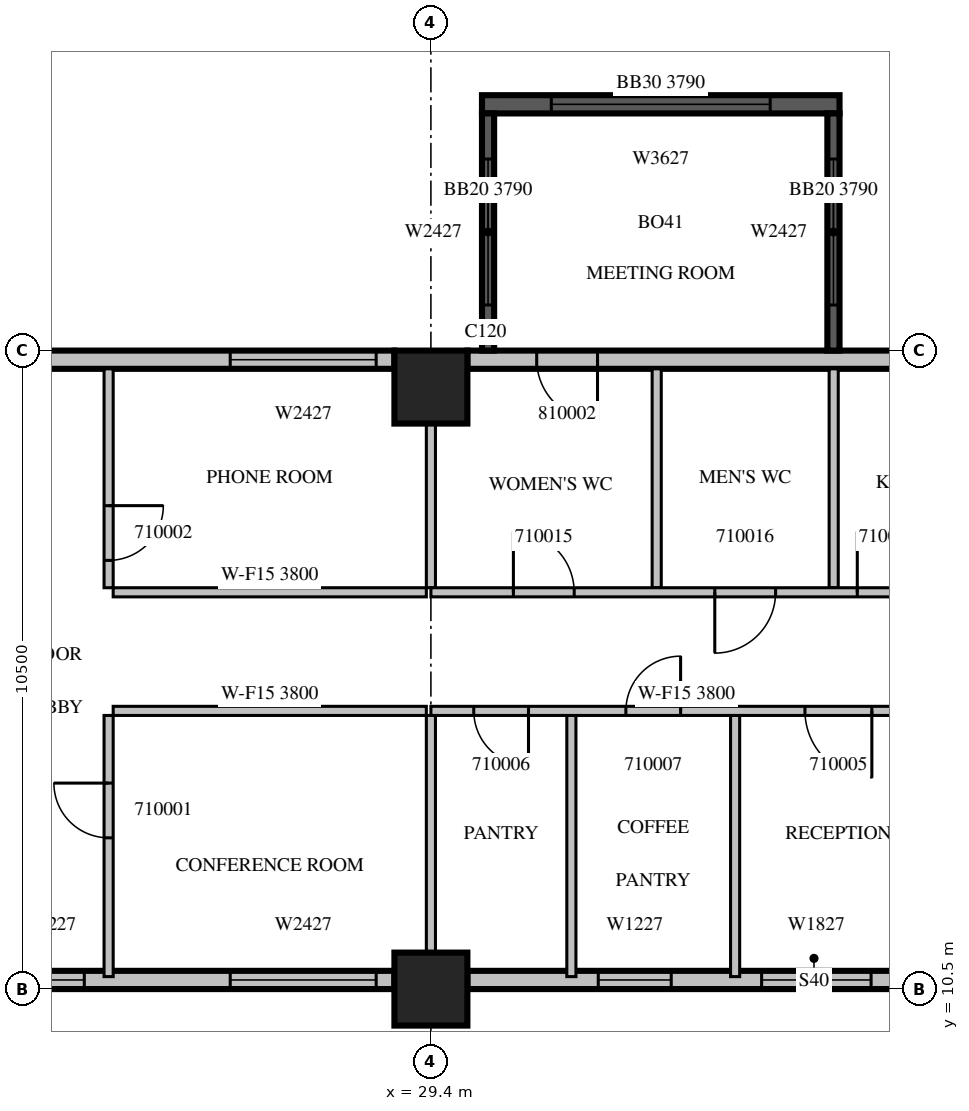
"""IFC4 building model, lengths in metres.
Left out: names, types, materials, properties, quantities, classifications, styles, units other than length and angle.
Written with IfcOpenShell. Run it as: python <this file> out.ifc"""

import sys

from ifc_helpers import new_model, si_unit, direction, frame, frame_2d, origin, origin_2d, place, context, subcontext, project, spatial, rectangle, extrude, source, transform, mapped, element, fill, save


model = new_model("IFC4")
c1 = context("Model", 3, precision=1e-05, world=origin(), true_north=direction((0.0, 1.0)))
c2 = subcontext(c1, "Body", "Model", "MODEL_VIEW")
j1 = project(units=[si_unit("LENGTHUNIT", "METRE"), si_unit("PLANEANGLEUNIT", "RADIAN")], contexts=[c1])
p1 = place(None, origin())
s1 = spatial("IfcSite", under=j1, at=p1, CompositionType="ELEMENT")
p2 = place(p1, origin())
s2 = spatial("IfcBuilding", under=s1, at=p2, CompositionType="ELEMENT")
p3 = place(p2, frame((0.0, 0.0, 53.1)))
s3 = spatial("IfcBuildingStorey", under=s2, at=p3, CompositionType="ELEMENT", Elevation=53.1)
m1 = source(origin(), c2, "Body", "SweptSolid", [
    extrude(rectangle(XDim=1.2, YDim=1.2, at=origin_2d()), origin(), (0.0, 0.0, 1.0), 4.2),
])
for number, where, z_axis, x_axis in (
    (1, (29.4, 10.5, 0.0), (0.0, 0.0, 1.0), (1.0, 0.0, 0.0)),
    (2, (29.4, 20.4, 0.0), (0.0, 0.0, 1.0), (1.0, 0.0, 0.0)),
):
    element("IfcColumn", number, at=place(p3, frame(where, z_axis=z_axis, x_axis=x_axis)), inside=s3, PredefinedType="COLUMN", context=c2, shape_type="MappedRepresentation", body=[
        mapped(m1, transform((0.0, 0.0, 0.0), scale=1.0)),
    ])
m2 = source(origin(), c2, "Body", "SweptSolid", [
    extrude(rectangle(XDim=6.6, YDim=0.3, at=frame_2d((3.3, 0.0))), origin(), (0.0, 0.0, 1.0), 3.8),
])
p4 = place(p3, frame((22.2, 10.65, 0.0), z_axis=(0.0, 0.0, 1.0), x_axis=(1.0, 0.0, 0.0)))
e3 = element("IfcWall", 3, at=p4, inside=s3, PredefinedType="STANDARD", context=c2, shape_type="MappedRepresentation", body=[
    mapped(m2, transform((0.0, 0.0, 0.0), scale=1.0)),
])
m3 = source(origin(), c2, "Body", "SweptSolid", [
    extrude(rectangle(XDim=1.2, YDim=2.7, at=frame_2d((0.6, 1.35))), frame((0.0, 0.16, 0.0), z_axis=(0.0, -1.0, 0.0), x_axis=(1.0, 0.0, 0.0)), (0.0, 0.0, 1.0), 0.32),
])
p5 = place(p4, frame((0.3, 0.0, 0.6)))
e4 = element("IfcOpeningElement", 4, at=p5, cuts=e3, PredefinedType="OPENING", context=c2, shape_type="MappedRepresentation", body=[
    mapped(m3, transform((0.0, 0.0, 0.0), scale=1.0)),
])
m4 = source(origin(), c2, "Body", "SweptSolid", [
    extrude(rectangle(XDim=2.4, YDim=2.7, at=frame_2d((1.2, 1.35))), frame((0.0, 0.16, 0.0), z_axis=(0.0, -1.0, 0.0), x_axis=(1.0, 0.0, 0.0)), (0.0, 0.0, 1.0), 0.32),
])
p6 = place(p4, frame((3.9, 0.0, 0.6)))
e5 = element("IfcOpeningElement", 5, at=p6, cuts=e3, PredefinedType="OPENING", context=c2, shape_type="MappedRepresentation", body=[
    mapped(m4, transform((0.0, 0.0, 0.0), scale=1.0)),
])
m5 = source(origin(), c2, "Body", "SweptSolid", [
    extrude(rectangle(XDim=7.2, YDim=0.3, at=frame_2d((3.6, 0.0))), origin(), (0.0, 0.0, 1.0), 3.8),
])
p7 = place(p3, frame((30.0, 10.65, 0.0), z_axis=(0.0, 0.0, 1.0), x_axis=(1.0, 0.0, 0.0)))
e6 = element("IfcWall", 6, at=p7, inside=s3, PredefinedType="STANDARD", context=c2, shape_type="MappedRepresentation", body=[
    mapped(m5, transform((0.0, 0.0, 0.0), scale=1.0)),
])
m6 = source(origin(), c2, "Body", "SweptSolid", [
    extrude(rectangle(XDim=1.8, YDim=2.7, at=frame_2d((0.9, 1.35))), frame((0.0, 0.16, 0.0), z_axis=(0.0, -1.0, 0.0), x_axis=(1.0, 0.0, 0.0)), (0.0, 0.0, 1.0), 0.32),
])
p8 = place(p7, frame((4.839, 0.0, 0.6)))
e7 = element("IfcOpeningElement", 7, at=p8, cuts=e6, PredefinedType="OPENING", context=c2, shape_type="MappedRepresentation", body=[
    mapped(m6, transform((0.0, 0.0, 0.0), scale=1.0)),
])
p9 = place(p7, frame((2.152, 0.0, 0.6)))
e8 = element("IfcOpeningElement", 8, at=p9, cuts=e6, PredefinedType="OPENING", context=c2, shape_type="MappedRepresentation", body=[
    mapped(m3, transform((0.0, 0.0, 0.0), scale=1.0)),
])
p10 = place(p3, frame((37.2, 20.85, 0.0), z_axis=(0.0, 0.0, 1.0), x_axis=(-1.0, 0.0, 0.0)))
e9 = element("IfcWall", 9, at=p10, inside=s3, PredefinedType="STANDARD", context=c2, shape_type="MappedRepresentation", body=[
    mapped(m5, transform((0.0, 0.0, 0.0), scale=1.0)),
])
m7 = source(origin(), c2, "Body", "SweptSolid", [
    extrude(rectangle(XDim=1.0, YDim=2.1, at=frame_2d((0.5, 1.05))), frame((0.0, 0.16, 0.0), z_axis=(0.0, -1.0, 0.0), x_axis=(1.0, 0.0, 0.0)), (0.0, 0.0, 1.0), 0.32),
])
p11 = place(p10, frame((5.06, 0.0, 0.0)))
e10 = element("IfcOpeningElement", 10, at=p11, cuts=e9, PredefinedType="OPENING", context=c2, shape_type="MappedRepresentation", body=[
    mapped(m7, transform((0.0, 0.0, 0.0), scale=1.0)),
])
p12 = place(p3, frame((28.8, 20.85, 0.0), z_axis=(0.0, 0.0, 1.0), x_axis=(-1.0, 0.0, 0.0)))
e11 = element("IfcWall", 11, at=p12, inside=s3, PredefinedType="STANDARD", context=c2, shape_type="MappedRepresentation", body=[
    mapped(m2, transform((0.0, 0.0, 0.0), scale=1.0)),
])
p13 = place(p12, frame((0.3, 0.0, 0.6)))
e12 = element("IfcOpeningElement", 12, at=p13, cuts=e11, PredefinedType="OPENING", context=c2, shape_type="MappedRepresentation", body=[
    mapped(m4, transform((0.0, 0.0, 0.0), scale=1.0)),
])
m8 = source(origin(), c2, "Body", "SweptSolid", [
    extrude(rectangle(XDim=5.88, YDim=0.3, at=frame_2d((2.94, 0.0))), origin(), (0.0, 0.0, 1.0), 3.79),
])
p14 = place(p3, frame((36.12, 25.05, 0.0), z_axis=(0.0, 0.0, 1.0), x_axis=(-1.0, 0.0, 0.0)))
e13 = element("IfcWall", 13, at=p14, inside=s3, PredefinedType="SOLIDWALL", context=c2, shape_type="MappedRepresentation", body=[
    mapped(m8, transform((0.0, 0.0, 0.0), scale=1.0)),
])
m9 = source(origin(), c2, "Body", "SweptSolid", [
    extrude(rectangle(XDim=3.6, YDim=2.7, at=frame_2d((1.8, 1.35))), frame((0.0, 0.16, 0.0), z_axis=(0.0, -1.0, 0.0), x_axis=(1.0, 0.0, 0.0)), (0.0, 0.0, 1.0), 0.32),
])
p15 = place(p14, frame((1.14, 0.0, 0.6)))
e14 = element("IfcOpeningElement", 14, at=p15, cuts=e13, PredefinedType="OPENING", context=c2, shape_type="MappedRepresentation", body=[
    mapped(m9, transform((0.0, 0.0, 0.0), scale=1.0)),
])
m10 = source(origin(), c2, "Body", "SweptSolid", [
    extrude(rectangle(XDim=3.9, YDim=0.2, at=frame_2d((1.95, 0.0))), origin(), (0.0, 0.0, 1.0), 3.79),
])
p16 = place(p3, frame((36.02, 21.0, 0.0), z_axis=(0.0, 0.0, 1.0), x_axis=(0.0, 1.0, 0.0)))
e15 = element("IfcWall", 15, at=p16, inside=s3, PredefinedType="SOLIDWALL", context=c2, shape_type="MappedRepresentation", body=[
    mapped(m10, transform((0.0, 0.0, 0.0), scale=1.0)),
])
m11 = source(origin(), c2, "Body", "SweptSolid", [
    extrude(rectangle(XDim=2.4, YDim=2.7, at=frame_2d((1.2, 1.35))), frame((0.0, 0.11, 0.0), z_axis=(0.0, -1.0, 0.0), x_axis=(1.0, 0.0, 0.0)), (0.0, 0.0, 1.0), 0.22),
])
p17 = place(p16, frame((0.75, 0.0, 0.6)))
e16 = element("IfcOpeningElement", 16, at=p17, cuts=e15, PredefinedType="OPENING", context=c2, shape_type="MappedRepresentation", body=[
    mapped(m11, transform((0.0, 0.0, 0.0), scale=1.0)),
])
p18 = place(p3, frame((30.34, 21.0, 0.0), z_axis=(0.0, 0.0, 1.0), x_axis=(0.0, 1.0, 0.0)))
e17 = element("IfcWall", 17, at=p18, inside=s3, PredefinedType="SOLIDWALL", context=c2, shape_type="MappedRepresentation", body=[
    mapped(m10, transform((0.0, 0.0, 0.0), scale=1.0)),
])
p19 = place(p18, frame((0.75, 0.0, 0.6)))
e18 = element("IfcOpeningElement", 18, at=p19, cuts=e17, PredefinedType="OPENING", context=c2, shape_type="MappedRepresentation", body=[
    mapped(m11, transform((0.0, 0.0, 0.0), scale=1.0)),
])
m12 = source(origin(), c2, "Body", "SweptSolid", [
    extrude(rectangle(XDim=4.295, YDim=0.15, at=frame_2d((2.147, 0.0))), origin(), (0.0, 0.0, 1.0), 3.8),
])
p20 = place(p3, frame((24.1, 15.0, 0.0), z_axis=(0.0, 0.0, 1.0), x_axis=(0.0, -1.0, 0.0)))
e19 = element("IfcWall", 19, at=p20, inside=s3, PredefinedType="PARTITIONING", context=c2, shape_type="MappedRepresentation", body=[
    mapped(m12, transform((0.0, 0.0, 0.0), scale=1.0)),
])
m13 = source(origin(), c2, "Body", "SweptSolid", [
    extrude(rectangle(XDim=0.9, YDim=2.1, at=frame_2d((0.45, 1.05))), frame((0.0, 0.085, 0.0), z_axis=(0.0, -1.0, 0.0), x_axis=(1.0, 0.0, 0.0)), (0.0, 0.0, 1.0), 0.17),
])
p21 = place(p20, frame((1.113, 0.0, 0.0)))
e20 = element("IfcOpeningElement", 20, at=p21, cuts=e19, PredefinedType="OPENING", context=c2, shape_type="MappedRepresentation", body=[
    mapped(m13, transform((0.0, 0.0, 0.0), scale=1.0)),
])
m14 = source(origin(), c2, "Body", "SweptSolid", [
    extrude(rectangle(XDim=3.6, YDim=0.15, at=frame_2d((1.8, 0.0))), origin(), (0.0, 0.0, 1.0), 3.8),
])
p22 = place(p3, frame((24.1, 20.7, 0.0), z_axis=(0.0, 0.0, 1.0), x_axis=(0.0, -1.0, 0.0)))
e21 = element("IfcWall", 21, at=p22, inside=s3, PredefinedType="PARTITIONING", context=c2, shape_type="MappedRepresentation", body=[
    mapped(m14, transform((0.0, 0.0, 0.0), scale=1.0)),
])
p23 = place(p22, frame((2.25, 0.0, 0.0)))
e22 = element("IfcOpeningElement", 22, at=p23, cuts=e21, PredefinedType="OPENING", context=c2, shape_type="MappedRepresentation", body=[
    mapped(m13, transform((0.0, 0.0, 0.0), scale=1.0)),
])
m15 = source(origin(), c2, "Body", "SweptSolid", [
    extrude(rectangle(XDim=5.15, YDim=0.15, at=frame_2d((2.575, 0.0))), origin(), (0.0, 0.0, 1.0), 3.8),
])
for number, where, z_axis, x_axis in (
    (23, (29.325, 15.075, 0.0), (0.0, 0.0, 1.0), (-1.0, 0.0, 0.0)),
    (24, (24.175, 17.025, 0.0), (0.0, 0.0, 1.0), (1.0, 0.0, 0.0)),
):
    element("IfcWall", number, at=place(p3, frame(where, z_axis=z_axis, x_axis=x_axis)), inside=s3, PredefinedType="PARTITIONING", context=c2, shape_type="MappedRepresentation", body=[
        mapped(m15, transform((0.0, 0.0, 0.0), scale=1.0)),
    ])
m16 = source(origin(), c2, "Body", "SweptSolid", [
    extrude(rectangle(XDim=3.901, YDim=0.15, at=frame_2d((1.95, 0.0))), origin(), (0.0, 0.0, 1.0), 3.8),
])
p24 = place(p3, frame((29.4, 11.099, 0.0), z_axis=(0.0, 0.0, 1.0), x_axis=(0.0, 1.0, 0.0)))
e25 = element("IfcWall", 25, at=p24, inside=s3, PredefinedType="PARTITIONING", context=c2, shape_type="MappedRepresentation", body=[
    mapped(m16, transform((0.0, 0.0, 0.0), scale=1.0)),
])
m17 = source(origin(), c2, "Body", "SweptSolid", [
    extrude(rectangle(XDim=2.701, YDim=0.15, at=frame_2d((1.351, 0.0))), origin(), (0.0, 0.0, 1.0), 3.8),
])
p25 = place(p3, frame((29.4, 17.1, 0.0), z_axis=(0.0, 0.0, 1.0), x_axis=(0.0, 1.0, 0.0)))
e26 = element("IfcWall", 26, at=p25, inside=s3, PredefinedType="PARTITIONING", context=c2, shape_type="MappedRepresentation", body=[
    mapped(m17, transform((0.0, 0.0, 0.0), scale=1.0)),
])
for number, where, z_axis, x_axis in (
    (27, (31.71, 10.705, 0.0), (0.0, 0.0, 1.0), (0.0, 1.0, 0.0)),
    (28, (34.403, 10.705, 0.0), (0.0, 0.0, 1.0), (0.0, 1.0, 0.0)),
):
    element("IfcWall", number, at=place(p3, frame(where, z_axis=z_axis, x_axis=x_axis)), inside=s3, PredefinedType="PARTITIONING", context=c2, shape_type="MappedRepresentation", body=[
        mapped(m12, transform((0.0, 0.0, 0.0), scale=1.0)),
    ])
for number, where, z_axis, x_axis in (
    (29, (33.113, 20.7, 0.0), (0.0, 0.0, 1.0), (0.0, -1.0, 0.0)),
    (30, (36.024, 20.7, 0.0), (0.0, 0.0, 1.0), (0.0, -1.0, 0.0)),
):
    element("IfcWall", number, at=place(p3, frame(where, z_axis=z_axis, x_axis=x_axis)), inside=s3, PredefinedType="PARTITIONING", context=c2, shape_type="MappedRepresentation", body=[
        mapped(m14, transform((0.0, 0.0, 0.0), scale=1.0)),
    ])
m18 = source(origin(), c2, "Body", "SweptSolid", [
    extrude(rectangle(XDim=8.4, YDim=0.15, at=frame_2d((4.2, 0.0))), origin(), (0.0, 0.0, 1.0), 3.8),
])
p26 = place(p3, frame((37.8, 15.075, 0.0), z_axis=(0.0, 0.0, 1.0), x_axis=(-1.0, 0.0, 0.0)))
e31 = element("IfcWall", 31, at=p26, inside=s3, PredefinedType="PARTITIONING", context=c2, shape_type="MappedRepresentation", body=[
    mapped(m18, transform((0.0, 0.0, 0.0), scale=1.0)),
])
m19 = source(origin(), c2, "Body", "SweptSolid", [
    extrude(rectangle(XDim=1.1, YDim=2.1, at=frame_2d((0.55, 1.05))), frame((0.0, 0.085, 0.0), z_axis=(0.0, -1.0, 0.0), x_axis=(1.0, 0.0, 0.0)), (0.0, 0.0, 1.0), 0.17),
])
p27 = place(p26, frame((1.149, 0.0, 0.0)))
e32 = element("IfcOpeningElement", 32, at=p27, cuts=e31, PredefinedType="OPENING", context=c2, shape_type="MappedRepresentation", body=[
    mapped(m19, transform((0.0, 0.0, 0.0), scale=1.0)),
])
p28 = place(p26, frame((6.795, 0.0, 0.0)))
e33 = element("IfcOpeningElement", 33, at=p28, cuts=e31, PredefinedType="OPENING", context=c2, shape_type="MappedRepresentation", body=[
    mapped(m13, transform((0.0, 0.0, 0.0), scale=1.0)),
])
p29 = place(p26, frame((4.293, 0.0, 0.0)))
e34 = element("IfcOpeningElement", 34, at=p29, cuts=e31, PredefinedType="OPENING", context=c2, shape_type="MappedRepresentation", body=[
    mapped(m13, transform((0.0, 0.0, 0.0), scale=1.0)),
])
m20 = source(origin(), c2, "Body", "SweptSolid", [
    extrude(rectangle(XDim=37.5, YDim=0.15, at=frame_2d((18.75, 0.0))), origin(), (0.0, 0.0, 1.0), 3.8),
])
p30 = place(p3, frame((29.4, 17.025, 0.0), z_axis=(0.0, 0.0, 1.0), x_axis=(1.0, 0.0, 0.0)))
e35 = element("IfcWall", 35, at=p30, inside=s3, PredefinedType="PARTITIONING", context=c2, shape_type="MappedRepresentation", body=[
    mapped(m20, transform((0.0, 0.0, 0.0), scale=1.0)),
])
m21 = source(origin(), c2, "Body", "SweptSolid", [
    extrude(rectangle(XDim=1.0, YDim=2.1, at=frame_2d((0.5, 1.05))), frame((0.0, 0.085, 0.0), z_axis=(0.0, -1.0, 0.0), x_axis=(1.0, 0.0, 0.0)), (0.0, 0.0, 1.0), 0.17),
])
p31 = place(p30, frame((1.357, 0.0, 0.0)))
e36 = element("IfcOpeningElement", 36, at=p31, cuts=e35, PredefinedType="OPENING", context=c2, shape_type="MappedRepresentation", body=[
    mapped(m21, transform((0.0, 0.0, 0.0), scale=1.0)),
])
p32 = place(p30, frame((4.669, 0.0, 0.0)))
e37 = element("IfcOpeningElement", 37, at=p32, cuts=e35, PredefinedType="OPENING", context=c2, shape_type="MappedRepresentation", body=[
    mapped(m21, transform((0.0, 0.0, 0.0), scale=1.0)),
])
p33 = place(p30, frame((7.012, 0.0, 0.0)))
e38 = element("IfcOpeningElement", 38, at=p33, cuts=e35, PredefinedType="OPENING", context=c2, shape_type="MappedRepresentation", body=[
    mapped(m21, transform((0.0, 0.0, 0.0), scale=1.0)),
])
p34 = place(p30, frame((10.05, 0.0, 0.0)))
e39 = element("IfcOpeningElement", 39, at=p34, cuts=e35, PredefinedType="OPENING", context=c2, shape_type="MappedRepresentation", body=[
    mapped(m13, transform((0.0, 0.0, 0.0), scale=1.0)),
])
p35 = place(p30, frame((13.401, 0.0, 0.0)))
e40 = element("IfcOpeningElement", 40, at=p35, cuts=e35, PredefinedType="OPENING", context=c2, shape_type="MappedRepresentation", body=[
    mapped(m13, transform((0.0, 0.0, 0.0), scale=1.0)),
])
p36 = place(p30, frame((15.501, 0.0, 0.0)))
e41 = element("IfcOpeningElement", 41, at=p36, cuts=e35, PredefinedType="OPENING", context=c2, shape_type="MappedRepresentation", body=[
    mapped(m13, transform((0.0, 0.0, 0.0), scale=1.0)),
])
p37 = place(p30, frame((18.898, 0.0, 0.0)))
e42 = element("IfcOpeningElement", 42, at=p37, cuts=e35, PredefinedType="OPENING", context=c2, shape_type="MappedRepresentation", body=[
    mapped(m21, transform((0.0, 0.0, 0.0), scale=1.0)),
])
p38 = place(p30, frame((23.543, 0.0, 0.0)))
e43 = element("IfcOpeningElement", 43, at=p38, cuts=e35, PredefinedType="OPENING", context=c2, shape_type="MappedRepresentation", body=[
    mapped(m21, transform((0.0, 0.0, 0.0), scale=1.0)),
])
p39 = place(p30, frame((26.826, 0.0, 0.0)))
e44 = element("IfcOpeningElement", 44, at=p39, cuts=e35, PredefinedType="OPENING", context=c2, shape_type="MappedRepresentation", body=[
    mapped(m21, transform((0.0, 0.0, 0.0), scale=1.0)),
])
p40 = place(p30, frame((30.364, 0.0, 0.0)))
e45 = element("IfcOpeningElement", 45, at=p40, cuts=e35, PredefinedType="OPENING", context=c2, shape_type="MappedRepresentation", body=[
    mapped(m13, transform((0.0, 0.0, 0.0), scale=1.0)),
])
p41 = place(p30, frame((34.871, 0.0, 0.0)))
e46 = element("IfcOpeningElement", 46, at=p41, cuts=e35, PredefinedType="OPENING", context=c2, shape_type="MappedRepresentation", body=[
    mapped(m13, transform((0.0, 0.0, 0.0), scale=1.0)),
])
m22 = source(origin(), c2, "Body", "SweptSolid", [
    extrude(rectangle(XDim=1.2, YDim=2.7, at=frame_2d((0.6, 1.35))), frame((0.0, 0.03, 0.0), z_axis=(0.0, -1.0, 0.0), x_axis=(1.0, 0.0, 0.0)), (0.0, 0.0, 1.0), 0.06),
])
p42 = place(p5, origin())
e47 = element("IfcWindow", 47, at=p42, inside=s3, PartitioningType="SINGLE_PANEL", PredefinedType="WINDOW", context=c2, shape_type="MappedRepresentation", body=[
    mapped(m22, transform((0.0, 0.0, 0.0), scale=1.0)),
])
fill(e4, e47)
m23 = source(origin(), c2, "Body", "SweptSolid", [
    extrude(rectangle(XDim=2.4, YDim=2.7, at=frame_2d((1.2, 1.35))), frame((0.0, 0.03, 0.0), z_axis=(0.0, -1.0, 0.0), x_axis=(1.0, 0.0, 0.0)), (0.0, 0.0, 1.0), 0.06),
])
p43 = place(p6, origin())
e48 = element("IfcWindow", 48, at=p43, inside=s3, PartitioningType="SINGLE_PANEL", PredefinedType="WINDOW", context=c2, shape_type="MappedRepresentation", body=[
    mapped(m23, transform((0.0, 0.0, 0.0), scale=1.0)),
])
fill(e5, e48)
m24 = source(origin(), c2, "Body", "SweptSolid", [
    extrude(rectangle(XDim=1.8, YDim=2.7, at=frame_2d((0.9, 1.35))), frame((0.0, 0.03, 0.0), z_axis=(0.0, -1.0, 0.0), x_axis=(1.0, 0.0, 0.0)), (0.0, 0.0, 1.0), 0.06),
])
p44 = place(p8, origin())
e49 = element("IfcWindow", 49, at=p44, inside=s3, PartitioningType="SINGLE_PANEL", PredefinedType="WINDOW", context=c2, shape_type="MappedRepresentation", body=[
    mapped(m24, transform((0.0, 0.0, 0.0), scale=1.0)),
])
fill(e7, e49)
p45 = place(p9, origin())
e50 = element("IfcWindow", 50, at=p45, inside=s3, PartitioningType="SINGLE_PANEL", PredefinedType="WINDOW", context=c2, shape_type="MappedRepresentation", body=[
    mapped(m22, transform((0.0, 0.0, 0.0), scale=1.0)),
])
fill(e8, e50)
p46 = place(p13, origin())
e51 = element("IfcWindow", 51, at=p46, inside=s3, PartitioningType="SINGLE_PANEL", PredefinedType="WINDOW", context=c2, shape_type="MappedRepresentation", body=[
    mapped(m23, transform((0.0, 0.0, 0.0), scale=1.0)),
])
fill(e12, e51)
m25 = source(origin(), c2, "Body", "SweptSolid", [
    extrude(rectangle(XDim=3.6, YDim=2.7, at=frame_2d((1.8, 1.35))), frame((0.0, 0.03, 0.0), z_axis=(0.0, -1.0, 0.0), x_axis=(1.0, 0.0, 0.0)), (0.0, 0.0, 1.0), 0.06),
])
p47 = place(p15, origin())
e52 = element("IfcWindow", 52, at=p47, inside=s3, PartitioningType="SINGLE_PANEL", PredefinedType="WINDOW", context=c2, shape_type="MappedRepresentation", body=[
    mapped(m25, transform((0.0, 0.0, 0.0), scale=1.0)),
])
fill(e14, e52)
p48 = place(p17, origin())
e53 = element("IfcWindow", 53, at=p48, inside=s3, PartitioningType="SINGLE_PANEL", PredefinedType="WINDOW", context=c2, shape_type="MappedRepresentation", body=[
    mapped(m23, transform((0.0, 0.0, 0.0), scale=1.0)),
])
fill(e16, e53)
p49 = place(p19, origin())
e54 = element("IfcWindow", 54, at=p49, inside=s3, PartitioningType="SINGLE_PANEL", PredefinedType="WINDOW", context=c2, shape_type="MappedRepresentation", body=[
    mapped(m23, transform((0.0, 0.0, 0.0), scale=1.0)),
])
fill(e18, e54)
m26 = source(origin(), c2, "Body", "SweptSolid", [
    extrude(rectangle(XDim=0.9, YDim=2.1, at=frame_2d((0.45, 1.05))), frame((0.0, 0.025, 0.0), z_axis=(0.0, -1.0, 0.0), x_axis=(1.0, 0.0, 0.0)), (0.0, 0.0, 1.0), 0.05),
])
p50 = place(p21, origin())
e55 = element("IfcDoor", 55, at=p50, inside=s3, OperationType="SINGLE_SWING_RIGHT", PredefinedType="DOOR", context=c2, shape_type="MappedRepresentation", body=[
    mapped(m26, transform((0.0, 0.0, 0.0), scale=1.0)),
])
fill(e20, e55)
p51 = place(p23, origin())
e56 = element("IfcDoor", 56, at=p51, inside=s3, OperationType="SINGLE_SWING_LEFT", PredefinedType="DOOR", context=c2, shape_type="MappedRepresentation", body=[
    mapped(m26, transform((0.0, 0.0, 0.0), scale=1.0)),
])
fill(e22, e56)
m27 = source(origin(), c2, "Body", "SweptSolid", [
    extrude(rectangle(XDim=1.1, YDim=2.1, at=frame_2d((0.55, 1.05))), frame((0.0, 0.025, 0.0), z_axis=(0.0, -1.0, 0.0), x_axis=(1.0, 0.0, 0.0)), (0.0, 0.0, 1.0), 0.05),
])
p52 = place(p27, origin())
e57 = element("IfcDoor", 57, at=p52, inside=s3, OperationType="SINGLE_SWING_LEFT", PredefinedType="DOOR", context=c2, shape_type="MappedRepresentation", body=[
    mapped(m27, transform((0.0, 0.0, 0.0), scale=1.0)),
])
fill(e32, e57)
p53 = place(p28, origin())
e58 = element("IfcDoor", 58, at=p53, inside=s3, OperationType="SINGLE_SWING_LEFT", PredefinedType="DOOR", context=c2, shape_type="MappedRepresentation", body=[
    mapped(m26, transform((0.0, 0.0, 0.0), scale=1.0)),
])
fill(e33, e58)
p54 = place(p29, origin())
e59 = element("IfcDoor", 59, at=p54, inside=s3, OperationType="SINGLE_SWING_RIGHT", PredefinedType="DOOR", context=c2, shape_type="MappedRepresentation", body=[
    mapped(m26, transform((0.0, 0.0, 0.0), scale=1.0)),
])
fill(e34, e59)
m28 = source(origin(), c2, "Body", "SweptSolid", [
    extrude(rectangle(XDim=1.0, YDim=2.1, at=frame_2d((0.5, 1.05))), frame((0.0, 0.025, 0.0), z_axis=(0.0, -1.0, 0.0), x_axis=(1.0, 0.0, 0.0)), (0.0, 0.0, 1.0), 0.05),
])
p55 = place(p31, origin())
e60 = element("IfcDoor", 60, at=p55, inside=s3, OperationType="SINGLE_SWING_LEFT", PredefinedType="DOOR", context=c2, shape_type="MappedRepresentation", body=[
    mapped(m28, transform((0.0, 0.0, 0.0), scale=1.0)),
])
fill(e36, e60)
p56 = place(p32, origin())
e61 = element("IfcDoor", 61, at=p56, inside=s3, OperationType="SINGLE_SWING_RIGHT", PredefinedType="DOOR", context=c2, shape_type="MappedRepresentation", body=[
    mapped(m28, transform((0.0, 0.0, 0.0), scale=1.0)),
])
fill(e37, e61)
p57 = place(p33, origin())
e62 = element("IfcDoor", 62, at=p57, inside=s3, OperationType="SINGLE_SWING_LEFT", PredefinedType="DOOR", context=c2, shape_type="MappedRepresentation", body=[
    mapped(m28, transform((0.0, 0.0, 0.0), scale=1.0)),
])
fill(e38, e62)
p58 = place(p11, origin())
e63 = element("IfcDoor", 63, at=p58, inside=s3, OperationType="SINGLE_SWING_LEFT", PredefinedType="DOOR", context=c2, shape_type="MappedRepresentation", body=[
    mapped(m28, transform((0.0, 0.0, 0.0), scale=1.0)),
])
fill(e10, e63)
save(model, sys.argv[1])
